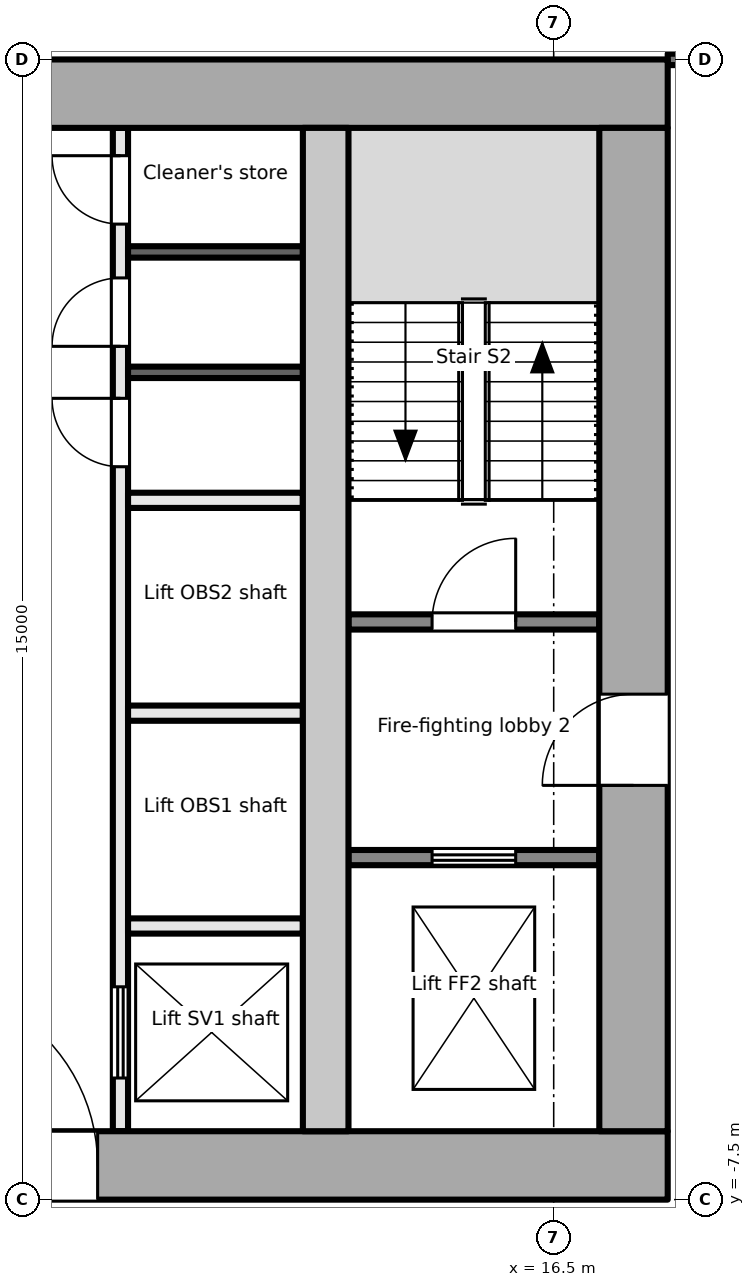
"""IFC4 building model, lengths in metres.
Left out: names, types, materials, properties, quantities, classifications, styles, units other than length and angle.
Written with IfcOpenShell. Run it as: python <this file> out.ifc"""

import sys

from ifc_helpers import new_model, si_unit, direction, frame, frame_2d, origin, place, context, subcontext, project, spatial, rectangle, extrude, element, fill, save


model = new_model("IFC4")
c1 = context("Model", 3, precision=1e-05, world=origin(), true_north=direction((0.0, 1.0)))
c2 = subcontext(c1, "Body", "Model", "MODEL_VIEW")
j1 = project(units=[si_unit("LENGTHUNIT", "METRE"), si_unit("PLANEANGLEUNIT", "RADIAN")], contexts=[c1])
p1 = place(None, origin())
s1 = spatial("IfcSite", under=j1, at=p1, CompositionType="ELEMENT")
p2 = place(p1, origin())
s2 = spatial("IfcBuilding", under=s1, at=p2, CompositionType="ELEMENT")
p3 = place(p2, frame((0.0, 0.0, 221.3)))
s3 = spatial("IfcBuildingStorey", under=s2, at=p3, CompositionType="ELEMENT", Elevation=221.3)
p4 = place(p3, frame((-18.0, -7.05, -0.2), z_axis=(0.0, 0.0, 1.0), x_axis=(1.0, 0.0, 0.0)))
e1 = element("IfcWall", 1, at=p4, inside=s3, PredefinedType="SHEAR", context=c2, shape_type="SweptSolid", body=[
    extrude(rectangle(XDim=36.0, YDim=0.9, at=frame_2d((18.0, 0.0))), origin(), (0.0, 0.0, 1.0), 3.9),
])
p5 = place(p4, frame((4.9, 0.0, 0.2)))
e2 = element("IfcOpeningElement", 2, at=p5, cuts=e1, PredefinedType="OPENING", context=c2, shape_type="SweptSolid", body=[
    extrude(rectangle(XDim=1.8, YDim=2.1, at=frame_2d((0.9, 1.05))), frame((0.0, 0.46, 0.0), z_axis=(0.0, -1.0, 0.0), x_axis=(1.0, 0.0, 0.0)), (0.0, 0.0, 1.0), 0.921),
])
p6 = place(p4, frame((16.8, 0.0, 0.2)))
e3 = element("IfcOpeningElement", 3, at=p6, cuts=e1, PredefinedType="OPENING", context=c2, shape_type="SweptSolid", body=[
    extrude(rectangle(XDim=2.4, YDim=2.1, at=frame_2d((1.2, 1.05))), frame((0.0, 0.46, 0.0), z_axis=(0.0, -1.0, 0.0), x_axis=(1.0, 0.0, 0.0)), (0.0, 0.0, 1.0), 0.921),
])
p7 = place(p4, frame((26.1, 0.0, 0.2)))
e4 = element("IfcOpeningElement", 4, at=p7, cuts=e1, PredefinedType="OPENING", context=c2, shape_type="SweptSolid", body=[
    extrude(rectangle(XDim=2.4, YDim=2.1, at=frame_2d((1.2, 1.05))), frame((0.0, 0.46, 0.0), z_axis=(0.0, -1.0, 0.0), x_axis=(1.0, 0.0, 0.0)), (0.0, 0.0, 1.0), 0.921),
])
p8 = place(p3, frame((-18.0, 7.05, -0.2), z_axis=(0.0, 0.0, 1.0), x_axis=(1.0, 0.0, 0.0)))
e5 = element("IfcWall", 5, at=p8, inside=s3, PredefinedType="SHEAR", context=c2, shape_type="SweptSolid", body=[
    extrude(rectangle(XDim=36.0, YDim=0.9, at=frame_2d((18.0, 0.0))), origin(), (0.0, 0.0, 1.0), 3.9),
])
p9 = place(p3, frame((17.55, -6.6, -0.2), z_axis=(0.0, 0.0, 1.0), x_axis=(0.0, 1.0, 0.0)))
e6 = element("IfcWall", 6, at=p9, inside=s3, PredefinedType="SHEAR", context=c2, shape_type="SweptSolid", body=[
    extrude(rectangle(XDim=13.2, YDim=0.9, at=frame_2d((6.6, 0.0))), origin(), (0.0, 0.0, 1.0), 3.9),
])
p10 = place(p9, frame((4.55, 0.0, 0.2)))
e7 = element("IfcOpeningElement", 7, at=p10, cuts=e6, PredefinedType="OPENING", context=c2, shape_type="SweptSolid", body=[
    extrude(rectangle(XDim=1.2, YDim=2.1, at=frame_2d((0.6, 1.05))), frame((0.0, 0.46, 0.0), z_axis=(0.0, -1.0, 0.0), x_axis=(1.0, 0.0, 0.0)), (0.0, 0.0, 1.0), 0.921),
])
p11 = place(p3, frame((13.5, -6.6, -0.2), z_axis=(0.0, 0.0, 1.0), x_axis=(0.0, 1.0, 0.0)))
e8 = element("IfcWall", 8, at=p11, inside=s3, PredefinedType="SHEAR", context=c2, shape_type="SweptSolid", body=[
    extrude(rectangle(XDim=13.2, YDim=0.6, at=frame_2d((6.6, 0.0))), origin(), (0.0, 0.0, 1.0), 3.9),
])
p12 = place(p3, frame((13.8, -3.0, 0.0), z_axis=(0.0, 0.0, 1.0), x_axis=(1.0, 0.0, 0.0)))
e9 = element("IfcWall", 9, at=p12, inside=s3, PredefinedType="PARTITIONING", context=c2, shape_type="SweptSolid", body=[
    extrude(rectangle(XDim=3.3, YDim=0.2, at=frame_2d((1.65, 0.0))), origin(), (0.0, 0.0, 1.0), 3.7),
])
p13 = place(p12, frame((1.1, 0.0, 0.0)))
e10 = element("IfcOpeningElement", 10, at=p13, cuts=e9, PredefinedType="OPENING", context=c2, shape_type="SweptSolid", body=[
    extrude(rectangle(XDim=1.1, YDim=2.1, at=frame_2d((0.55, 1.05))), frame((0.0, 0.111, 0.0), z_axis=(0.0, -1.0, 0.0), x_axis=(1.0, 0.0, 0.0)), (0.0, 0.0, 1.0), 0.221),
])
p14 = place(p3, frame((13.8, 0.1, 0.0), z_axis=(0.0, 0.0, 1.0), x_axis=(1.0, 0.0, 0.0)))
e11 = element("IfcWall", 11, at=p14, inside=s3, PredefinedType="PARTITIONING", context=c2, shape_type="SweptSolid", body=[
    extrude(rectangle(XDim=3.3, YDim=0.2, at=frame_2d((1.65, 0.0))), origin(), (0.0, 0.0, 1.0), 3.7),
])
p15 = place(p14, frame((1.1, 0.0, 0.0)))
e12 = element("IfcOpeningElement", 12, at=p15, cuts=e11, PredefinedType="OPENING", context=c2, shape_type="SweptSolid", body=[
    extrude(rectangle(XDim=1.1, YDim=2.1, at=frame_2d((0.55, 1.05))), frame((0.0, 0.111, 0.0), z_axis=(0.0, -1.0, 0.0), x_axis=(1.0, 0.0, 0.0)), (0.0, 0.0, 1.0), 0.221),
])
p16 = place(p3, frame((10.8, -6.6, 0.0), z_axis=(0.0, 0.0, 1.0), x_axis=(0.0, 1.0, 0.0)))
e13 = element("IfcWall", 13, at=p16, inside=s3, PredefinedType="PARTITIONING", context=c2, shape_type="SweptSolid", body=[
    extrude(rectangle(XDim=13.2, YDim=0.2, at=frame_2d((6.6, 0.0))), origin(), (0.0, 0.0, 1.0), 3.7),
])
p17 = place(p16, frame((0.7, 0.0, 0.0)))
e14 = element("IfcOpeningElement", 14, at=p17, cuts=e13, PredefinedType="OPENING", context=c2, shape_type="SweptSolid", body=[
    extrude(rectangle(XDim=1.2, YDim=2.1, at=frame_2d((0.6, 1.05))), frame((0.0, 0.111, 0.0), z_axis=(0.0, -1.0, 0.0), x_axis=(1.0, 0.0, 0.0)), (0.0, 0.0, 1.0), 0.221),
])
p18 = place(p16, frame((8.742, 0.0, 0.0)))
e15 = element("IfcOpeningElement", 15, at=p18, cuts=e13, PredefinedType="OPENING", context=c2, shape_type="SweptSolid", body=[
    extrude(rectangle(XDim=0.9, YDim=2.1, at=frame_2d((0.45, 1.05))), frame((0.0, 0.111, 0.0), z_axis=(0.0, -1.0, 0.0), x_axis=(1.0, 0.0, 0.0)), (0.0, 0.0, 1.0), 0.221),
])
p19 = place(p16, frame((10.326, 0.0, 0.0)))
e16 = element("IfcOpeningElement", 16, at=p19, cuts=e13, PredefinedType="OPENING", context=c2, shape_type="SweptSolid", body=[
    extrude(rectangle(XDim=0.9, YDim=2.1, at=frame_2d((0.45, 1.05))), frame((0.0, 0.111, 0.0), z_axis=(0.0, -1.0, 0.0), x_axis=(1.0, 0.0, 0.0)), (0.0, 0.0, 1.0), 0.221),
])
p20 = place(p16, frame((11.934, 0.0, 0.0)))
e17 = element("IfcOpeningElement", 17, at=p20, cuts=e13, PredefinedType="OPENING", context=c2, shape_type="SweptSolid", body=[
    extrude(rectangle(XDim=0.9, YDim=2.1, at=frame_2d((0.45, 1.05))), frame((0.0, 0.111, 0.0), z_axis=(0.0, -1.0, 0.0), x_axis=(1.0, 0.0, 0.0)), (0.0, 0.0, 1.0), 0.221),
])
for number, where, z_axis, x_axis in (
    (18, (10.9, -3.9, 0.0), (0.0, 0.0, 1.0), (1.0, 0.0, 0.0)),
    (19, (10.9, -1.1, 0.0), (0.0, 0.0, 1.0), (1.0, 0.0, 0.0)),
    (20, (10.9, 1.7, 0.0), (0.0, 0.0, 1.0), (1.0, 0.0, 0.0)),
):
    element("IfcWall", number, at=place(p3, frame(where, z_axis=z_axis, x_axis=x_axis)), inside=s3, PredefinedType="PARTITIONING", context=c2, shape_type="SweptSolid", body=[
        extrude(rectangle(XDim=2.3, YDim=0.2, at=frame_2d((1.15, 0.0))), origin(), (0.0, 0.0, 1.0), 3.7),
    ])
for number, where, z_axis, x_axis in (
    (21, (10.9, 3.384, 0.0), (0.0, 0.0, 1.0), (1.0, 0.0, 0.0)),
    (22, (10.9, 4.968, 0.0), (0.0, 0.0, 1.0), (1.0, 0.0, 0.0)),
):
    element("IfcWall", number, at=place(p3, frame(where, z_axis=z_axis, x_axis=x_axis)), inside=s3, PredefinedType="PARTITIONING", context=c2, shape_type="SweptSolid", body=[
        extrude(rectangle(XDim=2.3, YDim=0.15, at=frame_2d((1.15, 0.0))), origin(), (0.0, 0.0, 1.0), 3.7),
    ])
p21 = place(p3, frame((18.0, 7.501, 0.0), z_axis=(0.0, 0.0, 1.0), x_axis=(1.0, 0.0, 0.0)))
e23 = element("IfcWall", 23, at=p21, inside=s3, PredefinedType="PARTITIONING", context=c2, shape_type="SweptSolid", body=[
    extrude(rectangle(XDim=2.625, YDim=0.15, at=frame_2d((1.312, 0.0))), origin(), (0.0, 0.0, 1.0), 3.7),
])
p22 = place(p13, origin())
e24 = element("IfcDoor", 24, at=p22, inside=s3, OperationType="DOUBLE_DOOR_SLIDING", PredefinedType="DOOR", context=c2, shape_type="SweptSolid", body=[
    extrude(rectangle(XDim=1.1, YDim=2.1, at=frame_2d((0.55, 1.05))), frame((0.0, 0.025, 0.0), z_axis=(0.0, -1.0, 0.0), x_axis=(1.0, 0.0, 0.0)), (0.0, 0.0, 1.0), 0.05),
])
fill(e10, e24)
p23 = place(p10, origin())
e25 = element("IfcDoor", 25, at=p23, inside=s3, OperationType="SINGLE_SWING_LEFT", PredefinedType="DOOR", context=c2, shape_type="SweptSolid", body=[
    extrude(rectangle(XDim=1.2, YDim=2.1, at=frame_2d((0.6, 1.05))), frame((0.0, 0.025, 0.0), z_axis=(0.0, -1.0, 0.0), x_axis=(1.0, 0.0, 0.0)), (0.0, 0.0, 1.0), 0.05),
])
fill(e7, e25)
p24 = place(p15, origin())
e26 = element("IfcDoor", 26, at=p24, inside=s3, OperationType="SINGLE_SWING_RIGHT", PredefinedType="DOOR", context=c2, shape_type="SweptSolid", body=[
    extrude(rectangle(XDim=1.1, YDim=2.1, at=frame_2d((0.55, 1.05))), frame((0.0, 0.025, 0.0), z_axis=(0.0, -1.0, 0.0), x_axis=(1.0, 0.0, 0.0)), (0.0, 0.0, 1.0), 0.05),
])
fill(e12, e26)
p25 = place(p7, origin())
e27 = element("IfcDoor", 27, at=p25, inside=s3, OperationType="DOUBLE_DOOR_DOUBLE_SWING", PredefinedType="DOOR", context=c2, shape_type="SweptSolid", body=[
    extrude(rectangle(XDim=2.4, YDim=2.1, at=frame_2d((1.2, 1.05))), frame((0.0, 0.025, 0.0), z_axis=(0.0, -1.0, 0.0), x_axis=(1.0, 0.0, 0.0)), (0.0, 0.0, 1.0), 0.05),
])
fill(e4, e27)
p26 = place(p17, origin())
e28 = element("IfcDoor", 28, at=p26, inside=s3, OperationType="DOUBLE_DOOR_SLIDING", PredefinedType="DOOR", context=c2, shape_type="SweptSolid", body=[
    extrude(rectangle(XDim=1.2, YDim=2.1, at=frame_2d((0.6, 1.05))), frame((0.0, 0.025, 0.0), z_axis=(0.0, -1.0, 0.0), x_axis=(1.0, 0.0, 0.0)), (0.0, 0.0, 1.0), 0.05),
])
fill(e14, e28)
p27 = place(p18, origin())
e29 = element("IfcDoor", 29, at=p27, inside=s3, OperationType="SINGLE_SWING_RIGHT", PredefinedType="DOOR", context=c2, shape_type="SweptSolid", body=[
    extrude(rectangle(XDim=0.9, YDim=2.1, at=frame_2d((0.45, 1.05))), frame((0.0, 0.025, 0.0), z_axis=(0.0, -1.0, 0.0), x_axis=(1.0, 0.0, 0.0)), (0.0, 0.0, 1.0), 0.05),
])
fill(e15, e29)
p28 = place(p19, origin())
e30 = element("IfcDoor", 30, at=p28, inside=s3, OperationType="SINGLE_SWING_LEFT", PredefinedType="DOOR", context=c2, shape_type="SweptSolid", body=[
    extrude(rectangle(XDim=0.9, YDim=2.1, at=frame_2d((0.45, 1.05))), frame((0.0, 0.025, 0.0), z_axis=(0.0, -1.0, 0.0), x_axis=(1.0, 0.0, 0.0)), (0.0, 0.0, 1.0), 0.05),
])
fill(e16, e30)
p29 = place(p20, origin())
e31 = element("IfcDoor", 31, at=p29, inside=s3, OperationType="SINGLE_SWING_RIGHT", PredefinedType="DOOR", context=c2, shape_type="SweptSolid", body=[
    extrude(rectangle(XDim=0.9, YDim=2.1, at=frame_2d((0.45, 1.05))), frame((0.0, 0.025, 0.0), z_axis=(0.0, -1.0, 0.0), x_axis=(1.0, 0.0, 0.0)), (0.0, 0.0, 1.0), 0.05),
])
fill(e17, e31)
save(model, sys.argv[1])
